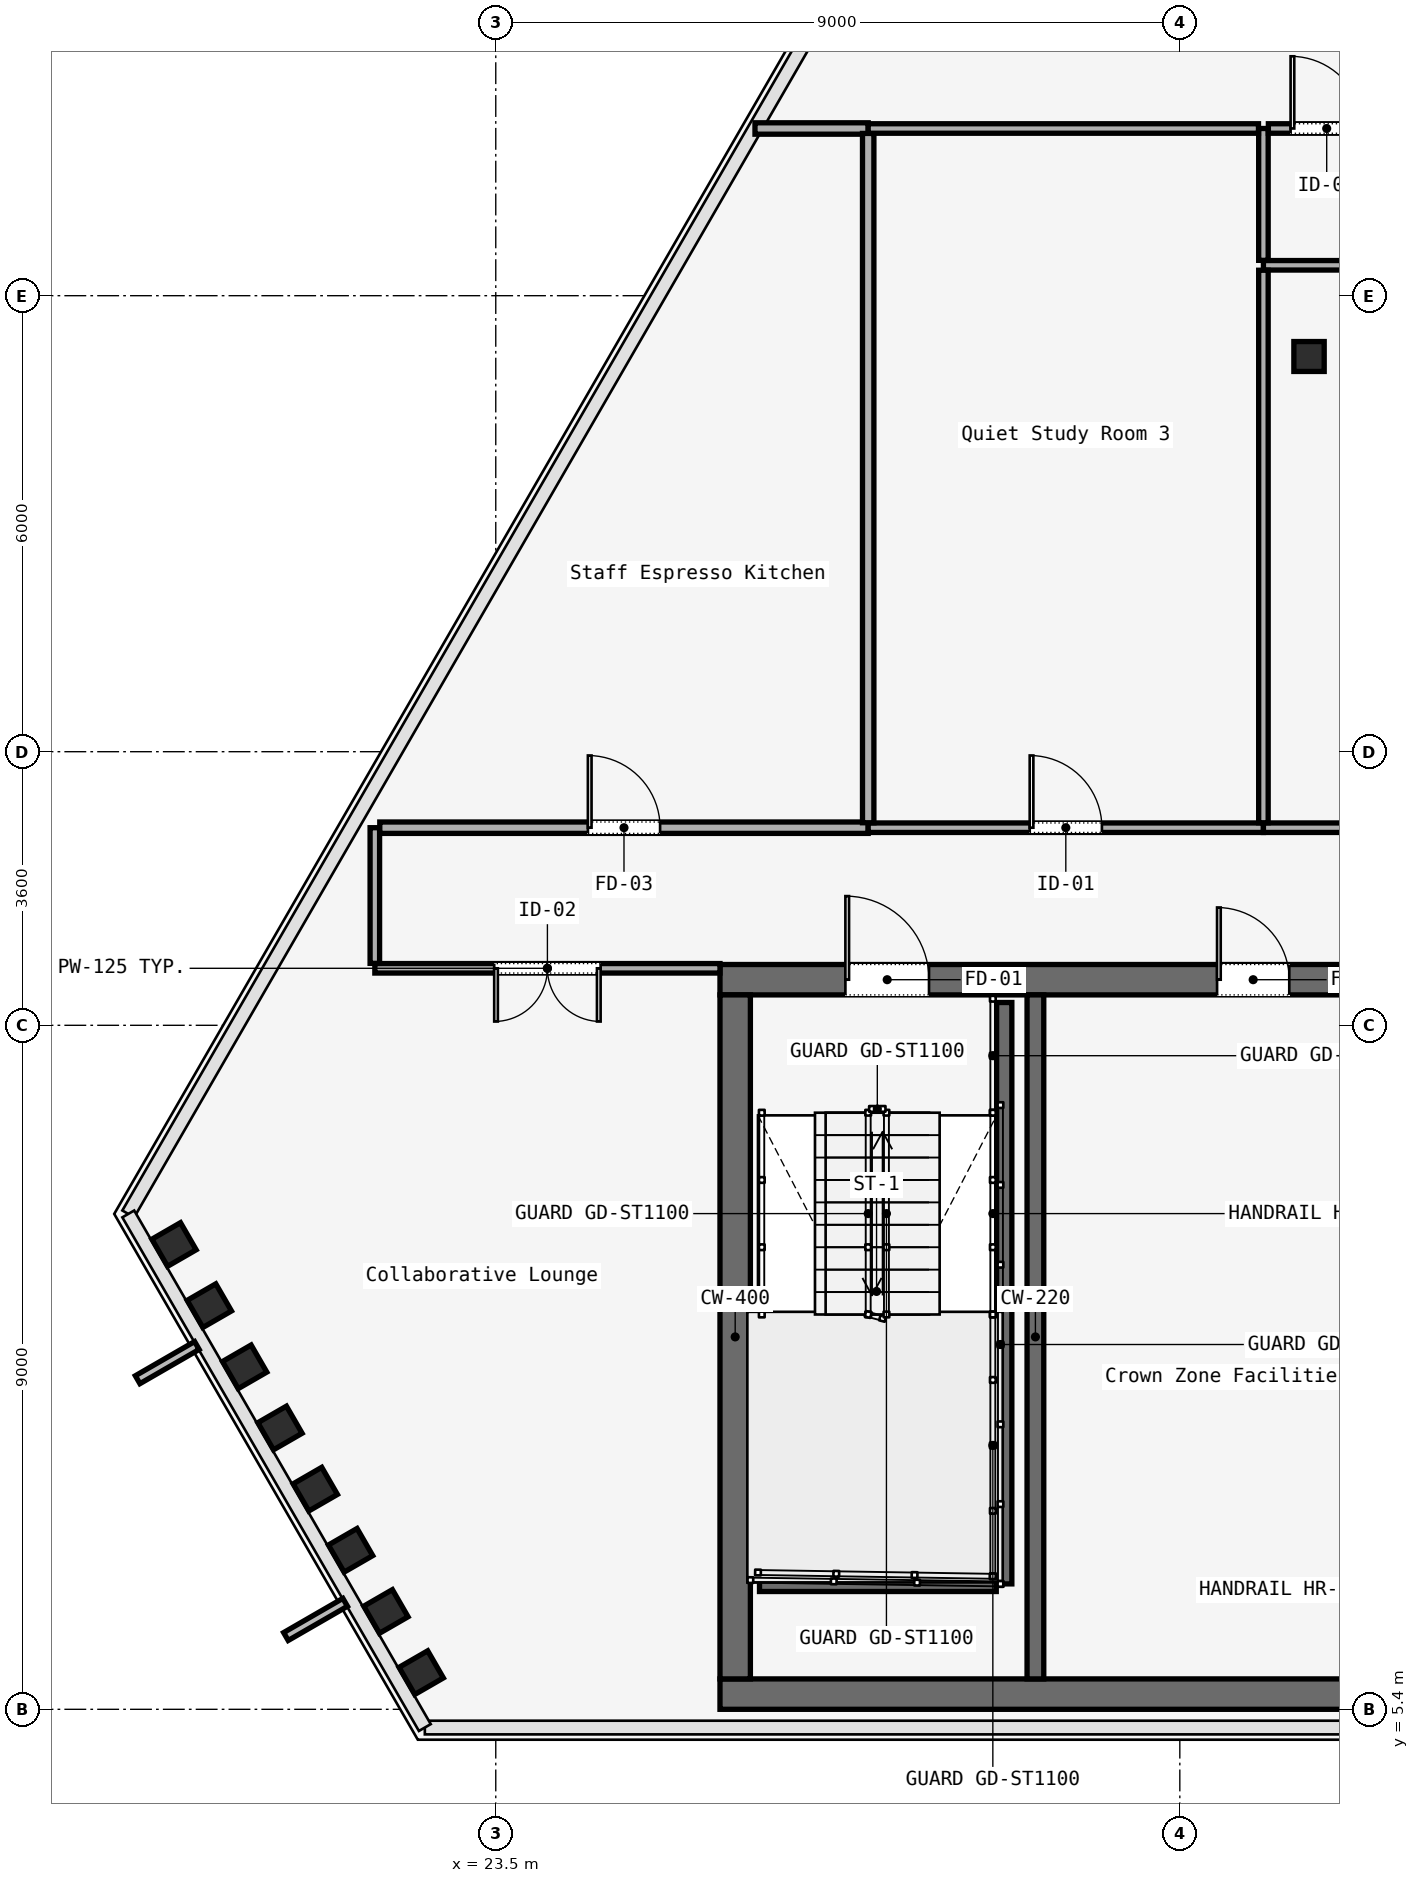
"""IFC4 building model, lengths in metres.
Left out: names, types, materials, properties, quantities, classifications, styles, units other than length and angle.
Written with IfcOpenShell. Run it as: python <this file> out.ifc"""

import sys

from ifc_helpers import new_model, si_unit, direction, frame, frame_2d, origin, origin_2d, place, context, subcontext, project, spatial, rectangle, i_section, extrude, element, fill, save


model = new_model("IFC4")
c1 = context("Model", 3, precision=1e-05, world=origin(), true_north=direction((0.0, 1.0)))
c2 = subcontext(c1, "Body", "Model", "MODEL_VIEW")
j1 = project(units=[si_unit("LENGTHUNIT", "METRE"), si_unit("PLANEANGLEUNIT", "RADIAN")], contexts=[c1])
p1 = place(None, origin())
s1 = spatial("IfcSite", under=j1, at=p1, CompositionType="ELEMENT")
p2 = place(p1, origin())
s2 = spatial("IfcBuilding", under=s1, at=p2, CompositionType="ELEMENT")
p3 = place(p2, frame((0.0, 0.0, 221.8)))
s3 = spatial("IfcBuildingStorey", under=s2, at=p3, CompositionType="ELEMENT", Elevation=221.8)
p4 = place(p3, frame((26.45, 15.0, 0.0), z_axis=(0.0, 0.0, 1.0), x_axis=(1.0, 0.0, 0.0)))
e1 = element("IfcWall", 1, at=p4, inside=s3, PredefinedType="SOLIDWALL", context=c2, shape_type="SweptSolid", body=[
    extrude(rectangle(XDim=31.1, YDim=0.4, at=frame_2d((15.55, 0.0))), origin(), (0.0, 0.0, 1.0), 3.58),
])
p5 = place(p4, frame((1.65, 0.0, 0.0)))
e2 = element("IfcOpeningElement", 2, at=p5, cuts=e1, PredefinedType="OPENING", context=c2, shape_type="SweptSolid", body=[
    extrude(rectangle(XDim=1.1, YDim=2.2, at=frame_2d((0.55, 1.1))), frame((0.0, 0.2, 0.0), z_axis=(0.0, -1.0, 0.0), x_axis=(1.0, 0.0, 0.0)), (0.0, 0.0, 1.0), 0.4),
])
p6 = place(p4, frame((13.65, 0.0, 0.0)))
e3 = element("IfcOpeningElement", 3, at=p6, cuts=e1, PredefinedType="OPENING", context=c2, shape_type="SweptSolid", body=[
    extrude(rectangle(XDim=1.1, YDim=2.2, at=frame_2d((0.55, 1.1))), frame((0.0, 0.2, 0.0), z_axis=(0.0, -1.0, 0.0), x_axis=(1.0, 0.0, 0.0)), (0.0, 0.0, 1.0), 0.4),
])
p7 = place(p4, frame((25.55, 0.0, 0.0)))
e4 = element("IfcOpeningElement", 4, at=p7, cuts=e1, PredefinedType="OPENING", context=c2, shape_type="SweptSolid", body=[
    extrude(rectangle(XDim=1.1, YDim=2.2, at=frame_2d((0.55, 1.1))), frame((0.0, 0.2, 0.0), z_axis=(0.0, -1.0, 0.0), x_axis=(1.0, 0.0, 0.0)), (0.0, 0.0, 1.0), 0.4),
])
p8 = place(p4, frame((19.35, 0.0, 0.0)))
e5 = element("IfcOpeningElement", 5, at=p8, cuts=e1, PredefinedType="OPENING", context=c2, shape_type="SweptSolid", body=[
    extrude(rectangle(XDim=1.1, YDim=2.2, at=frame_2d((0.55, 1.1))), frame((0.0, 0.2, 0.0), z_axis=(0.0, -1.0, 0.0), x_axis=(1.0, 0.0, 0.0)), (0.0, 0.0, 1.0), 0.4),
])
p9 = place(p4, frame((21.4, 0.0, 0.0)))
e6 = element("IfcOpeningElement", 6, at=p9, cuts=e1, PredefinedType="OPENING", context=c2, shape_type="SweptSolid", body=[
    extrude(rectangle(XDim=0.9, YDim=2.1, at=frame_2d((0.45, 1.05))), frame((0.0, 0.2, 0.0), z_axis=(0.0, -1.0, 0.0), x_axis=(1.0, 0.0, 0.0)), (0.0, 0.0, 1.0), 0.4),
])
p10 = place(p4, frame((6.54, 0.0, 0.0)))
e7 = element("IfcOpeningElement", 7, at=p10, cuts=e1, PredefinedType="OPENING", context=c2, shape_type="SweptSolid", body=[
    extrude(rectangle(XDim=0.95, YDim=2.2, at=frame_2d((0.475, 1.1))), frame((0.0, 0.2, 0.0), z_axis=(0.0, -1.0, 0.0), x_axis=(1.0, 0.0, 0.0)), (0.0, 0.0, 1.0), 0.4),
])
p11 = place(p4, frame((10.49, 0.0, 0.0)))
e8 = element("IfcOpeningElement", 8, at=p11, cuts=e1, PredefinedType="OPENING", context=c2, shape_type="SweptSolid", body=[
    extrude(rectangle(XDim=0.95, YDim=2.2, at=frame_2d((0.475, 1.1))), frame((0.0, 0.2, 0.0), z_axis=(0.0, -1.0, 0.0), x_axis=(1.0, 0.0, 0.0)), (0.0, 0.0, 1.0), 0.4),
])
p12 = place(p4, frame((23.35, 0.0, 0.0)))
e9 = element("IfcOpeningElement", 9, at=p12, cuts=e1, PredefinedType="OPENING", context=c2, shape_type="SweptSolid", body=[
    extrude(rectangle(XDim=1.3, YDim=2.3, at=frame_2d((0.65, 1.15))), frame((0.0, 0.2, 0.0), z_axis=(0.0, -1.0, 0.0), x_axis=(1.0, 0.0, 0.0)), (0.0, 0.0, 1.0), 0.4),
])
p13 = place(p3, frame((26.45, 5.6, 0.0), z_axis=(0.0, 0.0, 1.0), x_axis=(1.0, 0.0, 0.0)))
e10 = element("IfcWall", 10, at=p13, inside=s3, PredefinedType="SOLIDWALL", context=c2, shape_type="SweptSolid", body=[
    extrude(rectangle(XDim=31.1, YDim=0.4, at=frame_2d((15.55, 0.0))), origin(), (0.0, 0.0, 1.0), 3.58),
])
p14 = place(p3, frame((26.65, 5.8, 0.0), z_axis=(0.0, 0.0, 1.0), x_axis=(0.0, 1.0, 0.0)))
e11 = element("IfcWall", 11, at=p14, inside=s3, PredefinedType="SOLIDWALL", context=c2, shape_type="SweptSolid", body=[
    extrude(rectangle(XDim=9.0, YDim=0.4, at=frame_2d((4.5, 0.0))), origin(), (0.0, 0.0, 1.0), 3.58),
])
p15 = place(p3, frame((30.6, 5.8, 0.0), z_axis=(0.0, 0.0, 1.0), x_axis=(0.0, 1.0, 0.0)))
e12 = element("IfcWall", 12, at=p15, inside=s3, PredefinedType="SOLIDWALL", context=c2, shape_type="SweptSolid", body=[
    extrude(rectangle(XDim=9.0, YDim=0.22, at=frame_2d((4.5, 0.0))), origin(), (0.0, 0.0, 1.0), 3.58),
])
p16 = place(p3, frame((34.2, 23.2, 0.0), z_axis=(0.0, 0.0, 1.0), x_axis=(1.0, 0.0, 0.0)))
e13 = element("IfcColumn", 13, at=p16, inside=s3, PredefinedType="COLUMN", context=c2, shape_type="SweptSolid", body=[
    extrude(i_section(OverallWidth=0.399, OverallDepth=0.394, WebThickness=0.023, FlangeThickness=0.037, FilletRadius=0.015, at=origin_2d()), origin(), (0.0, 0.0, 1.0), 3.58),
])
for number, where, z_axis, x_axis in (
    (14, (19.267, 11.516, 0.0), (0.0, 0.0, 1.0), (-0.5, 0.866, 0.0)),
    (15, (19.731, 10.711, 0.0), (0.0, 0.0, 1.0), (-0.5, 0.866, 0.0)),
    (16, (20.196, 9.906, 0.0), (0.0, 0.0, 1.0), (-0.5, 0.866, 0.0)),
    (17, (20.661, 9.102, 0.0), (0.0, 0.0, 1.0), (-0.5, 0.866, 0.0)),
    (18, (21.125, 8.297, 0.0), (0.0, 0.0, 1.0), (-0.5, 0.866, 0.0)),
    (19, (21.59, 7.492, 0.0), (0.0, 0.0, 1.0), (-0.5, 0.866, 0.0)),
    (20, (22.054, 6.687, 0.0), (0.0, 0.0, 1.0), (-0.5, 0.866, 0.0)),
    (21, (22.519, 5.882, 0.0), (0.0, 0.0, 1.0), (-0.5, 0.866, 0.0)),
):
    element("IfcColumn", number, at=place(p3, frame(where, z_axis=z_axis, x_axis=x_axis)), inside=s3, PredefinedType="COLUMN", context=c2, shape_type="SweptSolid", body=[
        extrude(i_section(OverallWidth=0.412, OverallDepth=0.435, WebThickness=0.036, FlangeThickness=0.044, FilletRadius=0.015, at=origin_2d()), origin(), (0.0, 0.0, 1.0), 3.58),
    ])
p17 = place(p3, frame((30.19, 14.7, 0.0), z_axis=(0.0, 0.0, 1.0), x_axis=(0.0, -1.0, 0.0)))
e22 = element("IfcWall", 22, at=p17, inside=s3, PredefinedType="SOLIDWALL", context=c2, shape_type="SweptSolid", body=[
    extrude(rectangle(XDim=7.65, YDim=0.2, at=frame_2d((3.825, 0.0))), origin(), (0.0, 0.0, 1.0), 3.8),
])
p18 = place(p3, frame((26.97, 7.05, 0.0), z_axis=(0.0, 0.0, 1.0), x_axis=(1.0, 0.0, 0.0)))
e23 = element("IfcWall", 23, at=p18, inside=s3, PredefinedType="SOLIDWALL", context=c2, shape_type="SweptSolid", body=[
    extrude(rectangle(XDim=3.115, YDim=0.2, at=frame_2d((1.558, 0.0))), origin(), (0.0, 0.0, 1.0), 3.8),
])
p19 = place(p3, frame((26.45, 15.15, 0.0), z_axis=(0.0, 0.0, 1.0), x_axis=(-1.0, 0.0, 0.0)))
e24 = element("IfcWall", 24, at=p19, inside=s3, PredefinedType="PARTITIONING", context=c2, shape_type="SweptSolid", body=[
    extrude(rectangle(XDim=4.541, YDim=0.125, at=frame_2d((2.271, 0.0))), origin(), (0.0, 0.0, 1.0), 3.01),
])
p20 = place(p19, frame((1.571, 0.0, 0.0)))
e25 = element("IfcOpeningElement", 25, at=p20, cuts=e24, PredefinedType="OPENING", context=c2, shape_type="SweptSolid", body=[
    extrude(rectangle(XDim=1.4, YDim=2.2, at=frame_2d((0.7, 1.1))), frame((0.0, 0.062, 0.0), z_axis=(0.0, -1.0, 0.0), x_axis=(1.0, 0.0, 0.0)), (0.0, 0.0, 1.0), 0.125),
])
p21 = place(p3, frame((21.909, 15.215, 0.0), z_axis=(0.0, 0.0, 1.0), x_axis=(0.0, 1.0, 0.0)))
e26 = element("IfcWall", 26, at=p21, inside=s3, PredefinedType="PARTITIONING", context=c2, shape_type="SweptSolid", body=[
    extrude(rectangle(XDim=1.785, YDim=0.125, at=frame_2d((0.893, 0.0))), origin(), (0.0, 0.0, 1.0), 3.01),
])
p22 = place(p3, frame((21.974, 17.0, 0.0), z_axis=(0.0, 0.0, 1.0), x_axis=(1.0, 0.0, 0.0)))
e27 = element("IfcWall", 27, at=p22, inside=s3, PredefinedType="PARTITIONING", context=c2, shape_type="SweptSolid", body=[
    extrude(rectangle(XDim=6.426, YDim=0.15, at=frame_2d((3.213, 0.0))), origin(), (0.0, 0.0, 1.0), 3.01),
])
p23 = place(p22, frame((2.738, 0.0, 0.0)))
e28 = element("IfcOpeningElement", 28, at=p23, cuts=e27, PredefinedType="OPENING", context=c2, shape_type="SweptSolid", body=[
    extrude(rectangle(XDim=0.95, YDim=2.2, at=frame_2d((0.475, 1.1))), frame((0.0, 0.075, 0.0), z_axis=(0.0, -1.0, 0.0), x_axis=(1.0, 0.0, 0.0)), (0.0, 0.0, 1.0), 0.15),
])
p24 = place(p3, frame((28.4, 17.0, 0.0), z_axis=(0.0, 0.0, 1.0), x_axis=(1.0, 0.0, 0.0)))
e29 = element("IfcWall", 29, at=p24, inside=s3, PredefinedType="PARTITIONING", context=c2, shape_type="SweptSolid", body=[
    extrude(rectangle(XDim=5.2, YDim=0.125, at=frame_2d((2.6, 0.0))), origin(), (0.0, 0.0, 1.0), 3.01),
])
p25 = place(p24, frame((2.125, 0.0, 0.0)))
e30 = element("IfcOpeningElement", 30, at=p25, cuts=e29, PredefinedType="OPENING", context=c2, shape_type="SweptSolid", body=[
    extrude(rectangle(XDim=0.95, YDim=2.2, at=frame_2d((0.475, 1.1))), frame((0.0, 0.062, 0.0), z_axis=(0.0, -1.0, 0.0), x_axis=(1.0, 0.0, 0.0)), (0.0, 0.0, 1.0), 0.125),
])
p26 = place(p3, frame((33.6, 17.0, 0.0), z_axis=(0.0, 0.0, 1.0), x_axis=(1.0, 0.0, 0.0)))
e31 = element("IfcWall", 31, at=p26, inside=s3, PredefinedType="PARTITIONING", context=c2, shape_type="SweptSolid", body=[
    extrude(rectangle(XDim=7.55, YDim=0.125, at=frame_2d((3.775, 0.0))), origin(), (0.0, 0.0, 1.0), 3.01),
])
p27 = place(p26, frame((3.3, 0.0, 0.0)))
e32 = element("IfcOpeningElement", 32, at=p27, cuts=e31, PredefinedType="OPENING", context=c2, shape_type="SweptSolid", body=[
    extrude(rectangle(XDim=0.95, YDim=2.2, at=frame_2d((0.475, 1.1))), frame((0.0, 0.062, 0.0), z_axis=(0.0, -1.0, 0.0), x_axis=(1.0, 0.0, 0.0)), (0.0, 0.0, 1.0), 0.125),
])
p28 = place(p3, frame((41.085, 24.4, 0.0), z_axis=(0.0, 0.0, 1.0), x_axis=(-1.0, 0.0, 0.0)))
e33 = element("IfcWall", 33, at=p28, inside=s3, PredefinedType="PARTITIONING", context=c2, shape_type="SweptSolid", body=[
    extrude(rectangle(XDim=7.485, YDim=0.125, at=frame_2d((3.742, 0.0))), origin(), (0.0, 0.0, 1.0), 3.01),
])
p29 = place(p3, frame((33.6, 24.465, 0.0), z_axis=(0.0, 0.0, 1.0), x_axis=(0.0, 1.0, 0.0)))
e34 = element("IfcWall", 34, at=p29, inside=s3, PredefinedType="PARTITIONING", context=c2, shape_type="SweptSolid", body=[
    extrude(rectangle(XDim=1.735, YDim=0.125, at=frame_2d((0.867, 0.0))), origin(), (0.0, 0.0, 1.0), 3.01),
])
p30 = place(p3, frame((33.665, 26.2, 0.0), z_axis=(0.0, 0.0, 1.0), x_axis=(1.0, 0.0, 0.0)))
e35 = element("IfcWall", 35, at=p30, inside=s3, PredefinedType="PARTITIONING", context=c2, shape_type="SweptSolid", body=[
    extrude(rectangle(XDim=1.535, YDim=0.125, at=frame_2d((0.768, 0.0))), origin(), (0.0, 0.0, 1.0), 3.01),
])
p31 = place(p30, frame((0.292, 0.0, 0.0)))
e36 = element("IfcOpeningElement", 36, at=p31, cuts=e35, PredefinedType="OPENING", context=c2, shape_type="SweptSolid", body=[
    extrude(rectangle(XDim=0.95, YDim=2.2, at=frame_2d((0.475, 1.1))), frame((0.0, 0.062, 0.0), z_axis=(0.0, -1.0, 0.0), x_axis=(1.0, 0.0, 0.0)), (0.0, 0.0, 1.0), 0.125),
])
p32 = place(p3, frame((26.91, 26.2, 0.0), z_axis=(0.0, 0.0, 1.0), x_axis=(1.0, 0.0, 0.0)))
e37 = element("IfcWall", 37, at=p32, inside=s3, PredefinedType="PARTITIONING", context=c2, shape_type="SweptSolid", body=[
    extrude(rectangle(XDim=1.49, YDim=0.15, at=frame_2d((0.745, 0.0))), origin(), (0.0, 0.0, 1.0), 3.01),
])
p33 = place(p3, frame((28.4, 26.135, 0.0), z_axis=(0.0, 0.0, 1.0), x_axis=(0.0, -1.0, 0.0)))
e38 = element("IfcWall", 38, at=p33, inside=s3, PredefinedType="PARTITIONING", context=c2, shape_type="SweptSolid", body=[
    extrude(rectangle(XDim=9.07, YDim=0.15, at=frame_2d((4.535, 0.0))), origin(), (0.0, 0.0, 1.0), 3.01),
])
p34 = place(p3, frame((33.6, 17.065, 0.0), z_axis=(0.0, 0.0, 1.0), x_axis=(0.0, 1.0, 0.0)))
e39 = element("IfcWall", 39, at=p34, inside=s3, PredefinedType="PARTITIONING", context=c2, shape_type="SweptSolid", body=[
    extrude(rectangle(XDim=7.27, YDim=0.125, at=frame_2d((3.635, 0.0))), origin(), (0.0, 0.0, 1.0), 3.01),
])
p35 = place(p3, frame((28.4, 26.2, 0.0), z_axis=(0.0, 0.0, 1.0), x_axis=(1.0, 0.0, 0.0)))
e40 = element("IfcWall", 40, at=p35, inside=s3, PredefinedType="PARTITIONING", context=c2, shape_type="SweptSolid", body=[
    extrude(rectangle(XDim=5.135, YDim=0.125, at=frame_2d((2.567, 0.0))), origin(), (0.0, 0.0, 1.0), 3.01),
])
p36 = place(p5, origin())
e41 = element("IfcDoor", 41, at=p36, inside=s3, OperationType="SINGLE_SWING_RIGHT", PredefinedType="DOOR", context=c2, shape_type="SweptSolid", body=[
    extrude(rectangle(XDim=1.1, YDim=2.2, at=frame_2d((0.55, 1.1))), frame((0.0, 0.025, 0.0), z_axis=(0.0, -1.0, 0.0), x_axis=(1.0, 0.0, 0.0)), (0.0, 0.0, 1.0), 0.05),
])
fill(e2, e41)
p37 = place(p10, origin())
e42 = element("IfcDoor", 42, at=p37, inside=s3, OperationType="SINGLE_SWING_LEFT", PredefinedType="DOOR", context=c2, shape_type="SweptSolid", body=[
    extrude(rectangle(XDim=0.95, YDim=2.2, at=frame_2d((0.475, 1.1))), frame((0.0, 0.025, 0.0), z_axis=(0.0, -1.0, 0.0), x_axis=(1.0, 0.0, 0.0)), (0.0, 0.0, 1.0), 0.05),
])
fill(e7, e42)
p38 = place(p20, origin())
e43 = element("IfcDoor", 43, at=p38, inside=s3, OperationType="SINGLE_SWING_RIGHT", PredefinedType="DOOR", context=c2, shape_type="SweptSolid", body=[
    extrude(rectangle(XDim=1.4, YDim=2.2, at=frame_2d((0.7, 1.1))), frame((0.0, 0.025, 0.0), z_axis=(0.0, -1.0, 0.0), x_axis=(1.0, 0.0, 0.0)), (0.0, 0.0, 1.0), 0.05),
])
fill(e25, e43)
p39 = place(p23, origin())
e44 = element("IfcDoor", 44, at=p39, inside=s3, OperationType="SINGLE_SWING_LEFT", PredefinedType="DOOR", context=c2, shape_type="SweptSolid", body=[
    extrude(rectangle(XDim=0.95, YDim=2.2, at=frame_2d((0.475, 1.1))), frame((0.0, 0.025, 0.0), z_axis=(0.0, -1.0, 0.0), x_axis=(1.0, 0.0, 0.0)), (0.0, 0.0, 1.0), 0.05),
])
fill(e28, e44)
p40 = place(p25, origin())
e45 = element("IfcDoor", 45, at=p40, inside=s3, OperationType="SINGLE_SWING_LEFT", PredefinedType="DOOR", context=c2, shape_type="SweptSolid", body=[
    extrude(rectangle(XDim=0.95, YDim=2.2, at=frame_2d((0.475, 1.1))), frame((0.0, 0.025, 0.0), z_axis=(0.0, -1.0, 0.0), x_axis=(1.0, 0.0, 0.0)), (0.0, 0.0, 1.0), 0.05),
])
fill(e30, e45)
p41 = place(p31, origin())
e46 = element("IfcDoor", 46, at=p41, inside=s3, OperationType="SINGLE_SWING_LEFT", PredefinedType="DOOR", context=c2, shape_type="SweptSolid", body=[
    extrude(rectangle(XDim=0.95, YDim=2.2, at=frame_2d((0.475, 1.1))), frame((0.0, 0.025, 0.0), z_axis=(0.0, -1.0, 0.0), x_axis=(1.0, 0.0, 0.0)), (0.0, 0.0, 1.0), 0.05),
])
fill(e36, e46)
save(model, sys.argv[1])
